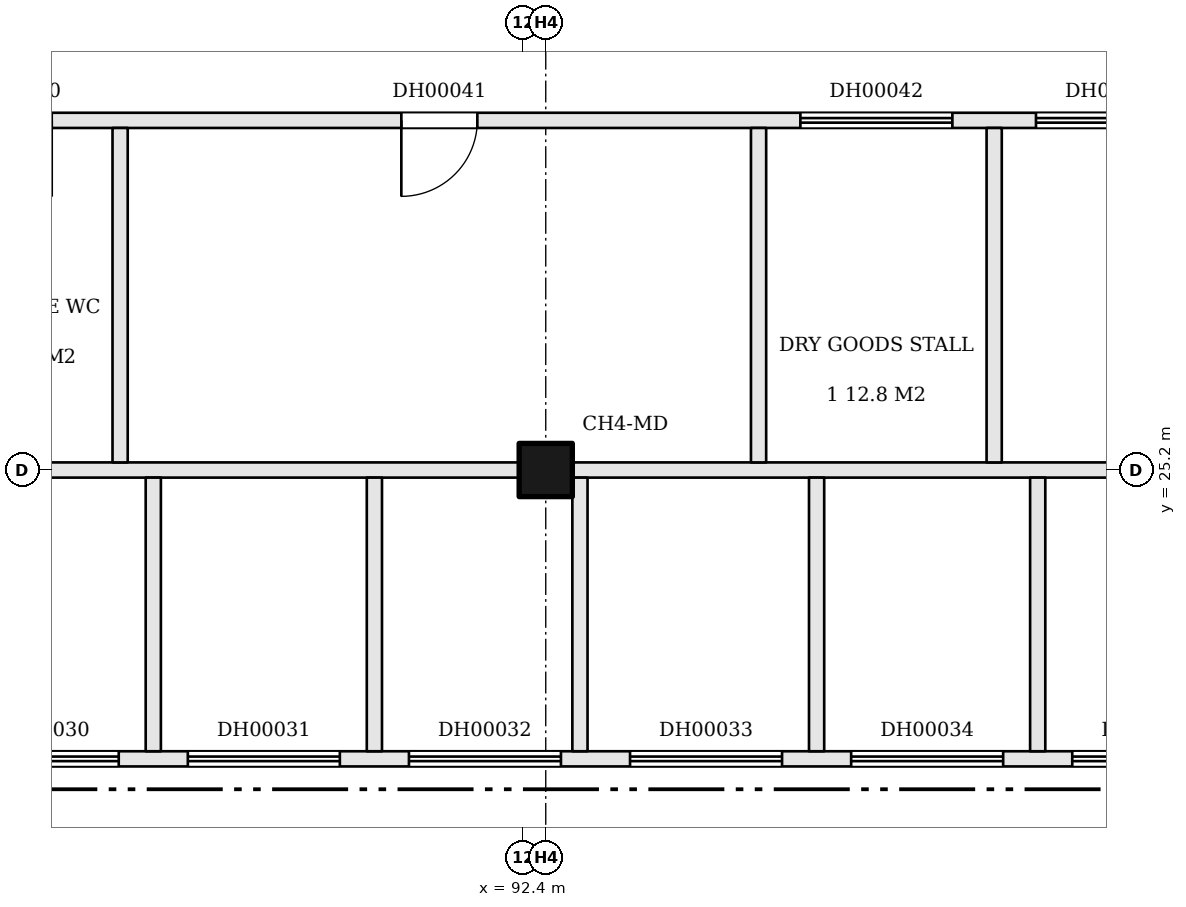
"""IFC4 building model, lengths in metres.
Left out: names, types, materials, properties, quantities, classifications, styles, units other than length and angle.
Written with IfcOpenShell. Run it as: python <this file> out.ifc"""

import sys

from ifc_helpers import new_model, si_unit, direction, frame, frame_2d, origin, origin_2d, place, context, subcontext, project, spatial, rectangle, extrude, element, fill, save


model = new_model("IFC4")
c1 = context("Model", 3, precision=1e-05, world=origin(), true_north=direction((0.0, 1.0)))
c2 = subcontext(c1, "Body", "Model", "MODEL_VIEW")
j1 = project(units=[si_unit("LENGTHUNIT", "METRE"), si_unit("PLANEANGLEUNIT", "RADIAN")], contexts=[c1])
p1 = place(None, origin())
s1 = spatial("IfcSite", under=j1, at=p1, CompositionType="ELEMENT")
p2 = place(p1, origin())
s2 = spatial("IfcBuilding", under=s1, at=p2, CompositionType="ELEMENT")
p3 = place(p2, origin())
s3 = spatial("IfcBuildingStorey", under=s2, at=p3, CompositionType="ELEMENT", Elevation=0.0)
p4 = place(p3, frame((92.7, 25.2, -0.2), z_axis=(0.0, 0.0, 1.0), x_axis=(1.0, 0.0, 0.0)))
e1 = element("IfcColumn", 1, at=p4, inside=s3, PredefinedType="COLUMN", context=c2, shape_type="SweptSolid", body=[
    extrude(rectangle(XDim=0.7, YDim=0.7, at=origin_2d()), origin(), (0.0, 0.0, 1.0), 8.9),
])
p5 = place(p3, frame((76.0, 21.4, 0.0), z_axis=(0.0, 0.0, 1.0), x_axis=(1.0, 0.0, 0.0)))
e2 = element("IfcWall", 2, at=p5, inside=s3, PredefinedType="PARTITIONING", context=c2, shape_type="SweptSolid", body=[
    extrude(rectangle(XDim=31.8, YDim=0.2, at=frame_2d((15.9, 0.0))), origin(), (0.0, 0.0, 1.0), 8.7),
])
p6 = place(p5, frame((0.354, 0.0, 0.0)))
e3 = element("IfcOpeningElement", 3, at=p6, cuts=e2, PredefinedType="OPENING", context=c2, shape_type="SweptSolid", body=[
    extrude(rectangle(XDim=2.0, YDim=2.4, at=frame_2d((1.0, 1.2))), frame((0.0, 0.11, 0.0), z_axis=(0.0, -1.0, 0.0), x_axis=(1.0, 0.0, 0.0)), (0.0, 0.0, 1.0), 0.22),
])
p7 = place(p5, frame((3.264, 0.0, 0.0)))
e4 = element("IfcOpeningElement", 4, at=p7, cuts=e2, PredefinedType="OPENING", context=c2, shape_type="SweptSolid", body=[
    extrude(rectangle(XDim=2.0, YDim=2.4, at=frame_2d((1.0, 1.2))), frame((0.0, 0.11, 0.0), z_axis=(0.0, -1.0, 0.0), x_axis=(1.0, 0.0, 0.0)), (0.0, 0.0, 1.0), 0.22),
])
p8 = place(p5, frame((6.173, 0.0, 0.0)))
e5 = element("IfcOpeningElement", 5, at=p8, cuts=e2, PredefinedType="OPENING", context=c2, shape_type="SweptSolid", body=[
    extrude(rectangle(XDim=2.0, YDim=2.4, at=frame_2d((1.0, 1.2))), frame((0.0, 0.11, 0.0), z_axis=(0.0, -1.0, 0.0), x_axis=(1.0, 0.0, 0.0)), (0.0, 0.0, 1.0), 0.22),
])
p9 = place(p5, frame((9.082, 0.0, 0.0)))
e6 = element("IfcOpeningElement", 6, at=p9, cuts=e2, PredefinedType="OPENING", context=c2, shape_type="SweptSolid", body=[
    extrude(rectangle(XDim=2.0, YDim=2.4, at=frame_2d((1.0, 1.2))), frame((0.0, 0.11, 0.0), z_axis=(0.0, -1.0, 0.0), x_axis=(1.0, 0.0, 0.0)), (0.0, 0.0, 1.0), 0.22),
])
p10 = place(p5, frame((11.991, 0.0, 0.0)))
e7 = element("IfcOpeningElement", 7, at=p10, cuts=e2, PredefinedType="OPENING", context=c2, shape_type="SweptSolid", body=[
    extrude(rectangle(XDim=2.0, YDim=2.4, at=frame_2d((1.0, 1.2))), frame((0.0, 0.11, 0.0), z_axis=(0.0, -1.0, 0.0), x_axis=(1.0, 0.0, 0.0)), (0.0, 0.0, 1.0), 0.22),
])
p11 = place(p5, frame((14.9, 0.0, 0.0)))
e8 = element("IfcOpeningElement", 8, at=p11, cuts=e2, PredefinedType="OPENING", context=c2, shape_type="SweptSolid", body=[
    extrude(rectangle(XDim=2.0, YDim=2.4, at=frame_2d((1.0, 1.2))), frame((0.0, 0.11, 0.0), z_axis=(0.0, -1.0, 0.0), x_axis=(1.0, 0.0, 0.0)), (0.0, 0.0, 1.0), 0.22),
])
p12 = place(p5, frame((17.809, 0.0, 0.0)))
e9 = element("IfcOpeningElement", 9, at=p12, cuts=e2, PredefinedType="OPENING", context=c2, shape_type="SweptSolid", body=[
    extrude(rectangle(XDim=2.0, YDim=2.4, at=frame_2d((1.0, 1.2))), frame((0.0, 0.11, 0.0), z_axis=(0.0, -1.0, 0.0), x_axis=(1.0, 0.0, 0.0)), (0.0, 0.0, 1.0), 0.22),
])
p13 = place(p5, frame((20.718, 0.0, 0.0)))
e10 = element("IfcOpeningElement", 10, at=p13, cuts=e2, PredefinedType="OPENING", context=c2, shape_type="SweptSolid", body=[
    extrude(rectangle(XDim=2.0, YDim=2.4, at=frame_2d((1.0, 1.2))), frame((0.0, 0.11, 0.0), z_axis=(0.0, -1.0, 0.0), x_axis=(1.0, 0.0, 0.0)), (0.0, 0.0, 1.0), 0.22),
])
p14 = place(p5, frame((23.627, 0.0, 0.0)))
e11 = element("IfcOpeningElement", 11, at=p14, cuts=e2, PredefinedType="OPENING", context=c2, shape_type="SweptSolid", body=[
    extrude(rectangle(XDim=2.0, YDim=2.4, at=frame_2d((1.0, 1.2))), frame((0.0, 0.11, 0.0), z_axis=(0.0, -1.0, 0.0), x_axis=(1.0, 0.0, 0.0)), (0.0, 0.0, 1.0), 0.22),
])
p15 = place(p5, frame((26.536, 0.0, 0.0)))
e12 = element("IfcOpeningElement", 12, at=p15, cuts=e2, PredefinedType="OPENING", context=c2, shape_type="SweptSolid", body=[
    extrude(rectangle(XDim=2.0, YDim=2.4, at=frame_2d((1.0, 1.2))), frame((0.0, 0.11, 0.0), z_axis=(0.0, -1.0, 0.0), x_axis=(1.0, 0.0, 0.0)), (0.0, 0.0, 1.0), 0.22),
])
p16 = place(p5, frame((29.446, 0.0, 0.0)))
e13 = element("IfcOpeningElement", 13, at=p16, cuts=e2, PredefinedType="OPENING", context=c2, shape_type="SweptSolid", body=[
    extrude(rectangle(XDim=2.0, YDim=2.4, at=frame_2d((1.0, 1.2))), frame((0.0, 0.11, 0.0), z_axis=(0.0, -1.0, 0.0), x_axis=(1.0, 0.0, 0.0)), (0.0, 0.0, 1.0), 0.22),
])
p17 = place(p3, frame((84.65, 25.2, 0.0), z_axis=(0.0, 0.0, 1.0), x_axis=(1.0, 0.0, 0.0)))
e14 = element("IfcWall", 14, at=p17, inside=s3, PredefinedType="PARTITIONING", context=c2, shape_type="SweptSolid", body=[
    extrude(rectangle(XDim=7.7, YDim=0.2, at=frame_2d((3.85, 0.0))), origin(), (0.0, 0.0, 1.0), 8.7),
])
p18 = place(p3, frame((93.05, 25.2, 0.0), z_axis=(0.0, 0.0, 1.0), x_axis=(1.0, 0.0, 0.0)))
e15 = element("IfcWall", 15, at=p18, inside=s3, PredefinedType="PARTITIONING", context=c2, shape_type="SweptSolid", body=[
    extrude(rectangle(XDim=7.7, YDim=0.2, at=frame_2d((3.85, 0.0))), origin(), (0.0, 0.0, 1.0), 8.7),
])
p19 = place(p3, frame((76.025, 29.8, 0.0), z_axis=(0.0, 0.0, 1.0), x_axis=(1.0, 0.0, 0.0)))
e16 = element("IfcWall", 16, at=p19, inside=s3, PredefinedType="PARTITIONING", context=c2, shape_type="SweptSolid", body=[
    extrude(rectangle(XDim=31.775, YDim=0.2, at=frame_2d((15.888, 0.0))), origin(), (0.0, 0.0, 1.0), 8.7),
])
p20 = place(p19, frame((1.538, 0.0, 0.0)))
e17 = element("IfcOpeningElement", 17, at=p20, cuts=e16, PredefinedType="OPENING", context=c2, shape_type="SweptSolid", body=[
    extrude(rectangle(XDim=1.0, YDim=2.1, at=frame_2d((0.5, 1.05))), frame((0.0, 0.11, 0.0), z_axis=(0.0, -1.0, 0.0), x_axis=(1.0, 0.0, 0.0)), (0.0, 0.0, 1.0), 0.22),
])
p21 = place(p19, frame((5.675, 0.0, 0.0)))
e18 = element("IfcOpeningElement", 18, at=p21, cuts=e16, PredefinedType="OPENING", context=c2, shape_type="SweptSolid", body=[
    extrude(rectangle(XDim=1.0, YDim=2.1, at=frame_2d((0.5, 1.05))), frame((0.0, 0.11, 0.0), z_axis=(0.0, -1.0, 0.0), x_axis=(1.0, 0.0, 0.0)), (0.0, 0.0, 1.0), 0.22),
])
p22 = place(p19, frame((9.175, 0.0, 0.0)))
e19 = element("IfcOpeningElement", 19, at=p22, cuts=e16, PredefinedType="OPENING", context=c2, shape_type="SweptSolid", body=[
    extrude(rectangle(XDim=1.0, YDim=2.1, at=frame_2d((0.5, 1.05))), frame((0.0, 0.11, 0.0), z_axis=(0.0, -1.0, 0.0), x_axis=(1.0, 0.0, 0.0)), (0.0, 0.0, 1.0), 0.22),
])
p23 = place(p19, frame((14.775, 0.0, 0.0)))
e20 = element("IfcOpeningElement", 20, at=p23, cuts=e16, PredefinedType="OPENING", context=c2, shape_type="SweptSolid", body=[
    extrude(rectangle(XDim=1.0, YDim=2.1, at=frame_2d((0.5, 1.05))), frame((0.0, 0.11, 0.0), z_axis=(0.0, -1.0, 0.0), x_axis=(1.0, 0.0, 0.0)), (0.0, 0.0, 1.0), 0.22),
])
p24 = place(p19, frame((20.025, 0.0, 0.0)))
e21 = element("IfcOpeningElement", 21, at=p24, cuts=e16, PredefinedType="OPENING", context=c2, shape_type="SweptSolid", body=[
    extrude(rectangle(XDim=2.0, YDim=2.4, at=frame_2d((1.0, 1.2))), frame((0.0, 0.11, 0.0), z_axis=(0.0, -1.0, 0.0), x_axis=(1.0, 0.0, 0.0)), (0.0, 0.0, 1.0), 0.22),
])
p25 = place(p19, frame((23.125, 0.0, 0.0)))
e22 = element("IfcOpeningElement", 22, at=p25, cuts=e16, PredefinedType="OPENING", context=c2, shape_type="SweptSolid", body=[
    extrude(rectangle(XDim=2.0, YDim=2.4, at=frame_2d((1.0, 1.2))), frame((0.0, 0.11, 0.0), z_axis=(0.0, -1.0, 0.0), x_axis=(1.0, 0.0, 0.0)), (0.0, 0.0, 1.0), 0.22),
])
p26 = place(p19, frame((26.225, 0.0, 0.0)))
e23 = element("IfcOpeningElement", 23, at=p26, cuts=e16, PredefinedType="OPENING", context=c2, shape_type="SweptSolid", body=[
    extrude(rectangle(XDim=2.0, YDim=2.4, at=frame_2d((1.0, 1.2))), frame((0.0, 0.11, 0.0), z_axis=(0.0, -1.0, 0.0), x_axis=(1.0, 0.0, 0.0)), (0.0, 0.0, 1.0), 0.22),
])
p27 = place(p19, frame((29.325, 0.0, 0.0)))
e24 = element("IfcOpeningElement", 24, at=p27, cuts=e16, PredefinedType="OPENING", context=c2, shape_type="SweptSolid", body=[
    extrude(rectangle(XDim=2.0, YDim=2.4, at=frame_2d((1.0, 1.2))), frame((0.0, 0.11, 0.0), z_axis=(0.0, -1.0, 0.0), x_axis=(1.0, 0.0, 0.0)), (0.0, 0.0, 1.0), 0.22),
])
p28 = place(p3, frame((87.1, 25.3, 0.0), z_axis=(0.0, 0.0, 1.0), x_axis=(0.0, 1.0, 0.0)))
e25 = element("IfcWall", 25, at=p28, inside=s3, PredefinedType="PARTITIONING", context=c2, shape_type="SweptSolid", body=[
    extrude(rectangle(XDim=4.4, YDim=0.2, at=frame_2d((2.2, 0.0))), origin(), (0.0, 0.0, 1.0), 8.7),
])
for number, where, z_axis, x_axis in (
    (26, (87.536, 21.5, 0.0), (0.0, 0.0, 1.0), (0.0, 1.0, 0.0)),
    (27, (90.446, 21.5, 0.0), (0.0, 0.0, 1.0), (0.0, 1.0, 0.0)),
    (28, (93.15, 21.5, 0.0), (0.0, 0.0, 1.0), (0.0, 1.0, 0.0)),
):
    element("IfcWall", number, at=place(p3, frame(where, z_axis=z_axis, x_axis=x_axis)), inside=s3, PredefinedType="PARTITIONING", context=c2, shape_type="SweptSolid", body=[
        extrude(rectangle(XDim=3.6, YDim=0.2, at=frame_2d((1.8, 0.0))), origin(), (0.0, 0.0, 1.0), 8.7),
    ])
p29 = place(p3, frame((95.5, 25.3, 0.0), z_axis=(0.0, 0.0, 1.0), x_axis=(0.0, 1.0, 0.0)))
e29 = element("IfcWall", 29, at=p29, inside=s3, PredefinedType="PARTITIONING", context=c2, shape_type="SweptSolid", body=[
    extrude(rectangle(XDim=4.4, YDim=0.2, at=frame_2d((2.2, 0.0))), origin(), (0.0, 0.0, 1.0), 8.7),
])
p30 = place(p3, frame((96.264, 21.5, 0.0), z_axis=(0.0, 0.0, 1.0), x_axis=(0.0, 1.0, 0.0)))
e30 = element("IfcWall", 30, at=p30, inside=s3, PredefinedType="PARTITIONING", context=c2, shape_type="SweptSolid", body=[
    extrude(rectangle(XDim=3.6, YDim=0.2, at=frame_2d((1.8, 0.0))), origin(), (0.0, 0.0, 1.0), 8.7),
])
p31 = place(p3, frame((98.6, 25.3, 0.0), z_axis=(0.0, 0.0, 1.0), x_axis=(0.0, 1.0, 0.0)))
e31 = element("IfcWall", 31, at=p31, inside=s3, PredefinedType="PARTITIONING", context=c2, shape_type="SweptSolid", body=[
    extrude(rectangle(XDim=4.4, YDim=0.2, at=frame_2d((2.2, 0.0))), origin(), (0.0, 0.0, 1.0), 8.7),
])
p32 = place(p3, frame((99.173, 21.5, 0.0), z_axis=(0.0, 0.0, 1.0), x_axis=(0.0, 1.0, 0.0)))
e32 = element("IfcWall", 32, at=p32, inside=s3, PredefinedType="PARTITIONING", context=c2, shape_type="SweptSolid", body=[
    extrude(rectangle(XDim=3.6, YDim=0.2, at=frame_2d((1.8, 0.0))), origin(), (0.0, 0.0, 1.0), 8.7),
])
p33 = place(p9, origin())
e33 = element("IfcDoor", 33, at=p33, inside=s3, OperationType="ROLLINGUP", PredefinedType="DOOR", context=c2, shape_type="SweptSolid", body=[
    extrude(rectangle(XDim=2.0, YDim=2.4, at=frame_2d((1.0, 1.2))), frame((0.0, 0.025, 0.0), z_axis=(0.0, -1.0, 0.0), x_axis=(1.0, 0.0, 0.0)), (0.0, 0.0, 1.0), 0.05),
])
fill(e6, e33)
p34 = place(p10, origin())
e34 = element("IfcDoor", 34, at=p34, inside=s3, OperationType="ROLLINGUP", PredefinedType="DOOR", context=c2, shape_type="SweptSolid", body=[
    extrude(rectangle(XDim=2.0, YDim=2.4, at=frame_2d((1.0, 1.2))), frame((0.0, 0.025, 0.0), z_axis=(0.0, -1.0, 0.0), x_axis=(1.0, 0.0, 0.0)), (0.0, 0.0, 1.0), 0.05),
])
fill(e7, e34)
p35 = place(p11, origin())
e35 = element("IfcDoor", 35, at=p35, inside=s3, OperationType="ROLLINGUP", PredefinedType="DOOR", context=c2, shape_type="SweptSolid", body=[
    extrude(rectangle(XDim=2.0, YDim=2.4, at=frame_2d((1.0, 1.2))), frame((0.0, 0.025, 0.0), z_axis=(0.0, -1.0, 0.0), x_axis=(1.0, 0.0, 0.0)), (0.0, 0.0, 1.0), 0.05),
])
fill(e8, e35)
p36 = place(p12, origin())
e36 = element("IfcDoor", 36, at=p36, inside=s3, OperationType="ROLLINGUP", PredefinedType="DOOR", context=c2, shape_type="SweptSolid", body=[
    extrude(rectangle(XDim=2.0, YDim=2.4, at=frame_2d((1.0, 1.2))), frame((0.0, 0.025, 0.0), z_axis=(0.0, -1.0, 0.0), x_axis=(1.0, 0.0, 0.0)), (0.0, 0.0, 1.0), 0.05),
])
fill(e9, e36)
p37 = place(p13, origin())
e37 = element("IfcDoor", 37, at=p37, inside=s3, OperationType="ROLLINGUP", PredefinedType="DOOR", context=c2, shape_type="SweptSolid", body=[
    extrude(rectangle(XDim=2.0, YDim=2.4, at=frame_2d((1.0, 1.2))), frame((0.0, 0.025, 0.0), z_axis=(0.0, -1.0, 0.0), x_axis=(1.0, 0.0, 0.0)), (0.0, 0.0, 1.0), 0.05),
])
fill(e10, e37)
p38 = place(p14, origin())
e38 = element("IfcDoor", 38, at=p38, inside=s3, OperationType="ROLLINGUP", PredefinedType="DOOR", context=c2, shape_type="SweptSolid", body=[
    extrude(rectangle(XDim=2.0, YDim=2.4, at=frame_2d((1.0, 1.2))), frame((0.0, 0.025, 0.0), z_axis=(0.0, -1.0, 0.0), x_axis=(1.0, 0.0, 0.0)), (0.0, 0.0, 1.0), 0.05),
])
fill(e11, e38)
p39 = place(p23, frame((1.0, 0.0, 0.0), z_axis=(0.0, 0.0, 1.0), x_axis=(-1.0, 0.0, 0.0)))
e39 = element("IfcDoor", 39, at=p39, inside=s3, OperationType="SINGLE_SWING_RIGHT", PredefinedType="DOOR", context=c2, shape_type="SweptSolid", body=[
    extrude(rectangle(XDim=1.0, YDim=2.1, at=frame_2d((0.5, 1.05))), frame((0.0, 0.025, 0.0), z_axis=(0.0, -1.0, 0.0), x_axis=(1.0, 0.0, 0.0)), (0.0, 0.0, 1.0), 0.05),
])
fill(e20, e39)
p40 = place(p24, origin())
e40 = element("IfcDoor", 40, at=p40, inside=s3, OperationType="ROLLINGUP", PredefinedType="DOOR", context=c2, shape_type="SweptSolid", body=[
    extrude(rectangle(XDim=2.0, YDim=2.4, at=frame_2d((1.0, 1.2))), frame((0.0, 0.025, 0.0), z_axis=(0.0, -1.0, 0.0), x_axis=(1.0, 0.0, 0.0)), (0.0, 0.0, 1.0), 0.05),
])
fill(e21, e40)
p41 = place(p25, origin())
e41 = element("IfcDoor", 41, at=p41, inside=s3, OperationType="ROLLINGUP", PredefinedType="DOOR", context=c2, shape_type="SweptSolid", body=[
    extrude(rectangle(XDim=2.0, YDim=2.4, at=frame_2d((1.0, 1.2))), frame((0.0, 0.025, 0.0), z_axis=(0.0, -1.0, 0.0), x_axis=(1.0, 0.0, 0.0)), (0.0, 0.0, 1.0), 0.05),
])
fill(e22, e41)
save(model, sys.argv[1])
